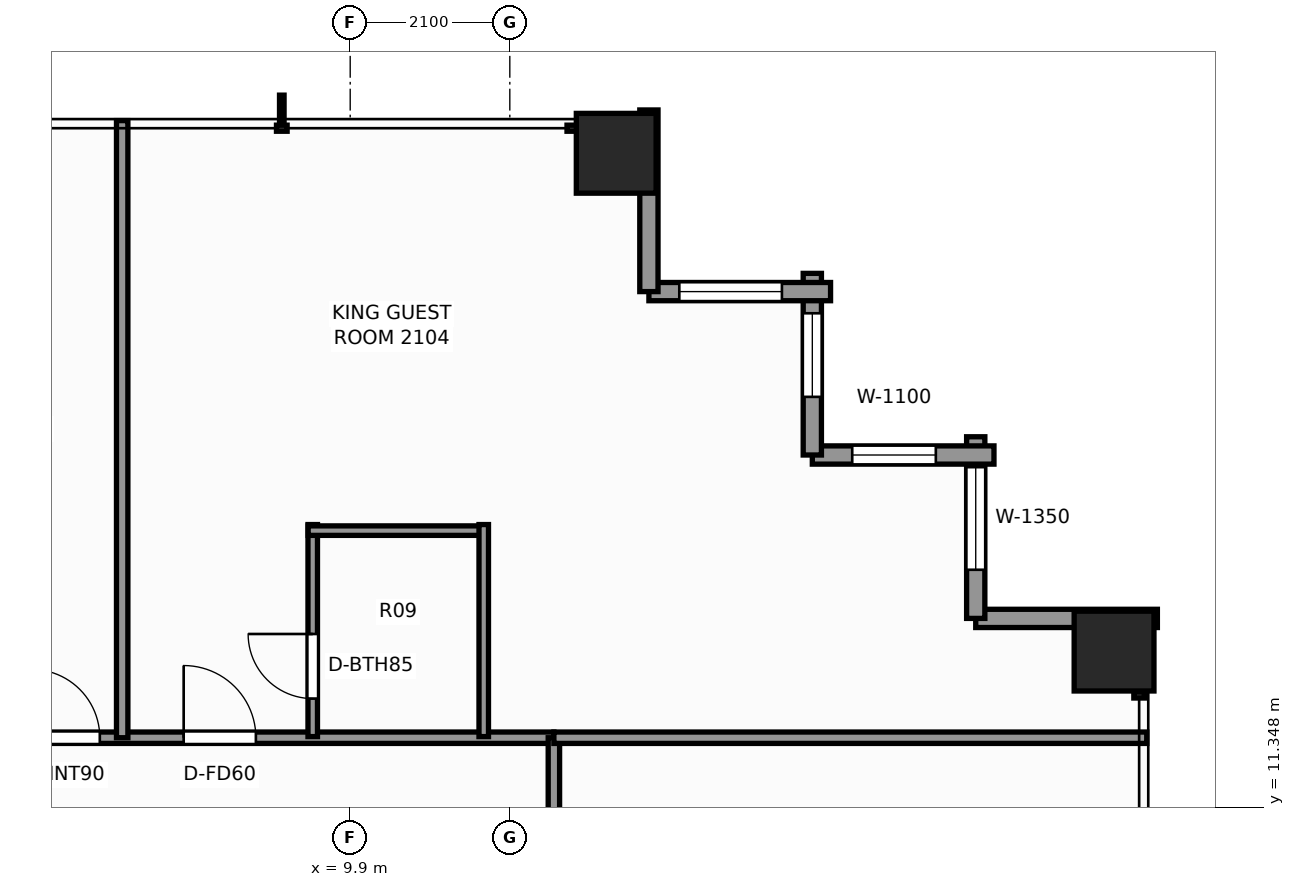
"""IFC4 building model, lengths in metres.
Left out: names, types, materials, properties, quantities, classifications, styles, units other than length and angle.
Written with IfcOpenShell. Run it as: python <this file> out.ifc"""

import sys

from ifc_helpers import new_model, si_unit, direction, frame, frame_2d, origin, origin_2d, place, context, subcontext, project, spatial, rectangle, extrude, element, fill, save


model = new_model("IFC4")
c1 = context("Model", 3, precision=1e-05, world=origin(), true_north=direction((0.0, 1.0)))
c2 = subcontext(c1, "Body", "Model", "MODEL_VIEW")
j1 = project(units=[si_unit("LENGTHUNIT", "METRE"), si_unit("PLANEANGLEUNIT", "RADIAN")], contexts=[c1])
p1 = place(None, origin())
s1 = spatial("IfcSite", under=j1, at=p1, CompositionType="ELEMENT")
p2 = place(p1, origin())
s2 = spatial("IfcBuilding", under=s1, at=p2, CompositionType="ELEMENT")
p3 = place(p2, frame((0.0, 0.0, 75.5)))
s3 = spatial("IfcBuildingStorey", under=s2, at=p3, CompositionType="ELEMENT", Elevation=75.5)
for number, where, z_axis, x_axis in (
    (1, (13.4, 19.95, 0.0), (0.0, 0.0, 1.0), (1.0, 0.0, 0.0)),
    (2, (19.95, 13.4, 0.0), (0.0, 0.0, 1.0), (1.0, 0.0, 0.0)),
):
    element("IfcColumn", number, at=place(p3, frame(where, z_axis=z_axis, x_axis=x_axis)), inside=s3, PredefinedType="COLUMN", context=c2, shape_type="SweptSolid", body=[
        extrude(rectangle(XDim=1.05, YDim=1.05, at=origin_2d()), origin(), (0.0, 0.0, 1.0), 3.3),
    ])
p4 = place(p3, frame((18.13, 13.83, 0.0), z_axis=(0.0, 0.0, 1.0), x_axis=(1.0, 0.0, 0.0)))
e3 = element("IfcWall", 3, at=p4, inside=s3, PredefinedType="STANDARD", context=c2, shape_type="SweptSolid", body=[
    extrude(rectangle(XDim=2.39, YDim=0.24, at=frame_2d((1.195, 0.0))), origin(), (0.0, 0.0, 1.0), 2.459),
])
p5 = place(p3, frame((18.13, 16.22, 0.0), z_axis=(0.0, 0.0, 1.0), x_axis=(0.0, -1.0, 0.0)))
e4 = element("IfcWall", 4, at=p5, inside=s3, PredefinedType="STANDARD", context=c2, shape_type="SweptSolid", body=[
    extrude(rectangle(XDim=2.39, YDim=0.24, at=frame_2d((1.195, 0.0))), origin(), (0.0, 0.0, 1.0), 2.459),
])
p6 = place(p5, frame((0.4, 0.0, 0.65)))
e5 = element("IfcOpeningElement", 5, at=p6, cuts=e4, PredefinedType="OPENING", context=c2, shape_type="SweptSolid", body=[
    extrude(rectangle(XDim=1.35, YDim=1.55, at=frame_2d((0.675, 0.775))), frame((0.0, 0.13, 0.0), z_axis=(0.0, -1.0, 0.0), x_axis=(1.0, 0.0, 0.0)), (0.0, 0.0, 1.0), 0.26),
])
p7 = place(p3, frame((15.98, 15.98, 0.0), z_axis=(0.0, 0.0, 1.0), x_axis=(1.0, 0.0, 0.0)))
e6 = element("IfcWall", 6, at=p7, inside=s3, PredefinedType="STANDARD", context=c2, shape_type="SweptSolid", body=[
    extrude(rectangle(XDim=2.39, YDim=0.24, at=frame_2d((1.195, 0.0))), origin(), (0.0, 0.0, 1.0), 2.459),
])
p8 = place(p7, frame((0.525, 0.0, 0.65)))
e7 = element("IfcOpeningElement", 7, at=p8, cuts=e6, PredefinedType="OPENING", context=c2, shape_type="SweptSolid", body=[
    extrude(rectangle(XDim=1.1, YDim=1.45, at=frame_2d((0.55, 0.725))), frame((0.0, 0.13, 0.0), z_axis=(0.0, -1.0, 0.0), x_axis=(1.0, 0.0, 0.0)), (0.0, 0.0, 1.0), 0.26),
])
p9 = place(p3, frame((15.98, 18.37, 0.0), z_axis=(0.0, 0.0, 1.0), x_axis=(0.0, -1.0, 0.0)))
e8 = element("IfcWall", 8, at=p9, inside=s3, PredefinedType="STANDARD", context=c2, shape_type="SweptSolid", body=[
    extrude(rectangle(XDim=2.39, YDim=0.24, at=frame_2d((1.195, 0.0))), origin(), (0.0, 0.0, 1.0), 2.459),
])
p10 = place(p9, frame((0.525, 0.0, 0.65)))
e9 = element("IfcOpeningElement", 9, at=p10, cuts=e8, PredefinedType="OPENING", context=c2, shape_type="SweptSolid", body=[
    extrude(rectangle(XDim=1.1, YDim=1.45, at=frame_2d((0.55, 0.725))), frame((0.0, 0.13, 0.0), z_axis=(0.0, -1.0, 0.0), x_axis=(1.0, 0.0, 0.0)), (0.0, 0.0, 1.0), 0.26),
])
p11 = place(p3, frame((13.83, 18.13, 0.0), z_axis=(0.0, 0.0, 1.0), x_axis=(1.0, 0.0, 0.0)))
e10 = element("IfcWall", 10, at=p11, inside=s3, PredefinedType="STANDARD", context=c2, shape_type="SweptSolid", body=[
    extrude(rectangle(XDim=2.39, YDim=0.24, at=frame_2d((1.195, 0.0))), origin(), (0.0, 0.0, 1.0), 2.459),
])
p12 = place(p11, frame((0.4, 0.0, 0.65)))
e11 = element("IfcOpeningElement", 11, at=p12, cuts=e10, PredefinedType="OPENING", context=c2, shape_type="SweptSolid", body=[
    extrude(rectangle(XDim=1.35, YDim=1.55, at=frame_2d((0.675, 0.775))), frame((0.0, 0.13, 0.0), z_axis=(0.0, -1.0, 0.0), x_axis=(1.0, 0.0, 0.0)), (0.0, 0.0, 1.0), 0.26),
])
p13 = place(p3, frame((13.83, 20.52, 0.0), z_axis=(0.0, 0.0, 1.0), x_axis=(0.0, -1.0, 0.0)))
e12 = element("IfcWall", 12, at=p13, inside=s3, PredefinedType="STANDARD", context=c2, shape_type="SweptSolid", body=[
    extrude(rectangle(XDim=2.39, YDim=0.24, at=frame_2d((1.195, 0.0))), origin(), (0.0, 0.0, 1.0), 2.459),
])
p14 = place(p3, frame((-12.42, 12.26, 0.0), z_axis=(0.0, 0.0, 1.0), x_axis=(1.0, 0.0, 0.0)))
e13 = element("IfcWall", 13, at=p14, inside=s3, PredefinedType="PARTITIONING", context=c2, shape_type="SweptSolid", body=[
    extrude(rectangle(XDim=25.0, YDim=0.15, at=frame_2d((12.5, 0.0))), origin(), (0.0, 0.0, 1.0), 2.292),
])
p15 = place(p14, frame((3.299, 0.0, 0.0)))
e14 = element("IfcOpeningElement", 14, at=p15, cuts=e13, PredefinedType="OPENING", context=c2, shape_type="SweptSolid", body=[
    extrude(rectangle(XDim=0.9, YDim=2.06, at=frame_2d((0.45, 1.03))), frame((0.0, 0.085, 0.0), z_axis=(0.0, -1.0, 0.0), x_axis=(1.0, 0.0, 0.0)), (0.0, 0.0, 1.0), 0.17),
])
p16 = place(p14, frame((5.634, 0.0, 0.0)))
e15 = element("IfcOpeningElement", 15, at=p16, cuts=e13, PredefinedType="OPENING", context=c2, shape_type="SweptSolid", body=[
    extrude(rectangle(XDim=0.9, YDim=2.06, at=frame_2d((0.45, 1.03))), frame((0.0, 0.085, 0.0), z_axis=(0.0, -1.0, 0.0), x_axis=(1.0, 0.0, 0.0)), (0.0, 0.0, 1.0), 0.17),
])
p17 = place(p14, frame((9.758, 0.0, 0.0)))
e16 = element("IfcOpeningElement", 16, at=p17, cuts=e13, PredefinedType="OPENING", context=c2, shape_type="SweptSolid", body=[
    extrude(rectangle(XDim=0.9, YDim=2.06, at=frame_2d((0.45, 1.03))), frame((0.0, 0.085, 0.0), z_axis=(0.0, -1.0, 0.0), x_axis=(1.0, 0.0, 0.0)), (0.0, 0.0, 1.0), 0.17),
])
p18 = place(p14, frame((13.357, 0.0, 0.0)))
e17 = element("IfcOpeningElement", 17, at=p18, cuts=e13, PredefinedType="OPENING", context=c2, shape_type="SweptSolid", body=[
    extrude(rectangle(XDim=0.95, YDim=2.06, at=frame_2d((0.475, 1.03))), frame((0.0, 0.085, 0.0), z_axis=(0.0, -1.0, 0.0), x_axis=(1.0, 0.0, 0.0)), (0.0, 0.0, 1.0), 0.17),
])
p19 = place(p14, frame((18.125, 0.0, 0.0)))
e18 = element("IfcOpeningElement", 18, at=p19, cuts=e13, PredefinedType="OPENING", context=c2, shape_type="SweptSolid", body=[
    extrude(rectangle(XDim=0.9, YDim=2.06, at=frame_2d((0.45, 1.03))), frame((0.0, 0.085, 0.0), z_axis=(0.0, -1.0, 0.0), x_axis=(1.0, 0.0, 0.0)), (0.0, 0.0, 1.0), 0.17),
])
p20 = place(p14, frame((20.129, 0.0, 0.0)))
e19 = element("IfcOpeningElement", 19, at=p20, cuts=e13, PredefinedType="OPENING", context=c2, shape_type="SweptSolid", body=[
    extrude(rectangle(XDim=0.95, YDim=2.06, at=frame_2d((0.475, 1.03))), frame((0.0, 0.085, 0.0), z_axis=(0.0, -1.0, 0.0), x_axis=(1.0, 0.0, 0.0)), (0.0, 0.0, 1.0), 0.17),
])
p21 = place(p3, frame((12.58, -12.58, 0.0), z_axis=(0.0, 0.0, 1.0), x_axis=(0.0, 1.0, 0.0)))
e20 = element("IfcWall", 20, at=p21, inside=s3, PredefinedType="PARTITIONING", context=c2, shape_type="SweptSolid", body=[
    extrude(rectangle(XDim=24.84, YDim=0.15, at=frame_2d((12.42, 0.0))), origin(), (0.0, 0.0, 1.0), 2.292),
])
p22 = place(p21, frame((4.149, 0.0, 0.0)))
e21 = element("IfcOpeningElement", 21, at=p22, cuts=e20, PredefinedType="OPENING", context=c2, shape_type="SweptSolid", body=[
    extrude(rectangle(XDim=0.95, YDim=2.06, at=frame_2d((0.475, 1.03))), frame((0.0, 0.085, 0.0), z_axis=(0.0, -1.0, 0.0), x_axis=(1.0, 0.0, 0.0)), (0.0, 0.0, 1.0), 0.17),
])
p23 = place(p21, frame((10.28, 0.0, 0.0)))
e22 = element("IfcOpeningElement", 22, at=p23, cuts=e20, PredefinedType="OPENING", context=c2, shape_type="SweptSolid", body=[
    extrude(rectangle(XDim=0.95, YDim=2.06, at=frame_2d((0.475, 1.03))), frame((0.0, 0.085, 0.0), z_axis=(0.0, -1.0, 0.0), x_axis=(1.0, 0.0, 0.0)), (0.0, 0.0, 1.0), 0.17),
])
p24 = place(p21, frame((18.983, 0.0, 0.0)))
e23 = element("IfcOpeningElement", 23, at=p24, cuts=e20, PredefinedType="OPENING", context=c2, shape_type="SweptSolid", body=[
    extrude(rectangle(XDim=0.95, YDim=2.06, at=frame_2d((0.475, 1.03))), frame((0.0, 0.085, 0.0), z_axis=(0.0, -1.0, 0.0), x_axis=(1.0, 0.0, 0.0)), (0.0, 0.0, 1.0), 0.17),
])
p25 = place(p21, frame((20.996, 0.0, 0.0)))
e24 = element("IfcOpeningElement", 24, at=p25, cuts=e20, PredefinedType="OPENING", context=c2, shape_type="SweptSolid", body=[
    extrude(rectangle(XDim=0.9, YDim=2.06, at=frame_2d((0.45, 1.03))), frame((0.0, 0.085, 0.0), z_axis=(0.0, -1.0, 0.0), x_axis=(1.0, 0.0, 0.0)), (0.0, 0.0, 1.0), 0.17),
])
p26 = place(p3, frame((12.58, 12.26, 0.0), z_axis=(0.0, 0.0, 1.0), x_axis=(1.0, 0.0, 0.0)))
e25 = element("IfcWall", 25, at=p26, inside=s3, PredefinedType="PARTITIONING", context=c2, shape_type="SweptSolid", body=[
    extrude(rectangle(XDim=7.8, YDim=0.15, at=frame_2d((3.9, 0.0))), origin(), (0.0, 0.0, 1.0), 2.292),
])
p27 = place(p3, frame((6.9, 12.26, 0.0), z_axis=(0.0, 0.0, 1.0), x_axis=(0.0, 1.0, 0.0)))
e26 = element("IfcWall", 26, at=p27, inside=s3, PredefinedType="PARTITIONING", context=c2, shape_type="SweptSolid", body=[
    extrude(rectangle(XDim=8.12, YDim=0.15, at=frame_2d((4.06, 0.0))), origin(), (0.0, 0.0, 1.0), 2.449),
])
p28 = place(p3, frame((9.407, 12.275, 0.0), z_axis=(0.0, 0.0, 1.0), x_axis=(0.0, 1.0, 0.0)))
e27 = element("IfcWall", 27, at=p28, inside=s3, PredefinedType="PARTITIONING", context=c2, shape_type="SweptSolid", body=[
    extrude(rectangle(XDim=2.79, YDim=0.125, at=frame_2d((1.395, 0.0))), origin(), (0.0, 0.0, 1.0), 3.08),
])
p29 = place(p28, frame((0.5, 0.0, 0.0)))
e28 = element("IfcOpeningElement", 28, at=p29, cuts=e27, PredefinedType="OPENING", context=c2, shape_type="SweptSolid", body=[
    extrude(rectangle(XDim=0.85, YDim=2.03, at=frame_2d((0.425, 1.015))), frame((0.0, 0.073, 0.0), z_axis=(0.0, -1.0, 0.0), x_axis=(1.0, 0.0, 0.0)), (0.0, 0.0, 1.0), 0.145),
])
p30 = place(p3, frame((9.347, 14.985, 0.0), z_axis=(0.0, 0.0, 1.0), x_axis=(1.0, 0.0, 0.0)))
e29 = element("IfcWall", 29, at=p30, inside=s3, PredefinedType="PARTITIONING", context=c2, shape_type="SweptSolid", body=[
    extrude(rectangle(XDim=2.37, YDim=0.125, at=frame_2d((1.185, 0.0))), origin(), (0.0, 0.0, 1.0), 2.292),
])
p31 = place(p3, frame((11.657, 12.275, 0.0), z_axis=(0.0, 0.0, 1.0), x_axis=(0.0, 1.0, 0.0)))
e30 = element("IfcWall", 30, at=p31, inside=s3, PredefinedType="PARTITIONING", context=c2, shape_type="SweptSolid", body=[
    extrude(rectangle(XDim=2.79, YDim=0.125, at=frame_2d((1.395, 0.0))), origin(), (0.0, 0.0, 1.0), 2.292),
])
p32 = place(p6, origin())
e31 = element("IfcWindow", 31, at=p32, inside=s3, PartitioningType="SINGLE_PANEL", PredefinedType="WINDOW", context=c2, shape_type="SweptSolid", body=[
    extrude(rectangle(XDim=1.35, YDim=1.55, at=frame_2d((0.675, 0.775))), frame((0.0, 0.03, 0.0), z_axis=(0.0, -1.0, 0.0), x_axis=(1.0, 0.0, 0.0)), (0.0, 0.0, 1.0), 0.06),
])
fill(e5, e31)
p33 = place(p8, origin())
e32 = element("IfcWindow", 32, at=p33, inside=s3, PartitioningType="SINGLE_PANEL", PredefinedType="WINDOW", context=c2, shape_type="SweptSolid", body=[
    extrude(rectangle(XDim=1.1, YDim=1.45, at=frame_2d((0.55, 0.725))), frame((0.0, 0.03, 0.0), z_axis=(0.0, -1.0, 0.0), x_axis=(1.0, 0.0, 0.0)), (0.0, 0.0, 1.0), 0.06),
])
fill(e7, e32)
p34 = place(p10, origin())
e33 = element("IfcWindow", 33, at=p34, inside=s3, PartitioningType="SINGLE_PANEL", PredefinedType="WINDOW", context=c2, shape_type="SweptSolid", body=[
    extrude(rectangle(XDim=1.1, YDim=1.45, at=frame_2d((0.55, 0.725))), frame((0.0, 0.03, 0.0), z_axis=(0.0, -1.0, 0.0), x_axis=(1.0, 0.0, 0.0)), (0.0, 0.0, 1.0), 0.06),
])
fill(e9, e33)
p35 = place(p12, origin())
e34 = element("IfcWindow", 34, at=p35, inside=s3, PartitioningType="SINGLE_PANEL", PredefinedType="WINDOW", context=c2, shape_type="SweptSolid", body=[
    extrude(rectangle(XDim=1.35, YDim=1.55, at=frame_2d((0.675, 0.775))), frame((0.0, 0.03, 0.0), z_axis=(0.0, -1.0, 0.0), x_axis=(1.0, 0.0, 0.0)), (0.0, 0.0, 1.0), 0.06),
])
fill(e11, e34)
p36 = place(p19, origin())
e35 = element("IfcDoor", 35, at=p36, inside=s3, OperationType="SINGLE_SWING_LEFT", PredefinedType="DOOR", context=c2, shape_type="SweptSolid", body=[
    extrude(rectangle(XDim=0.9, YDim=2.06, at=frame_2d((0.45, 1.03))), frame((0.0, 0.025, 0.0), z_axis=(0.0, -1.0, 0.0), x_axis=(1.0, 0.0, 0.0)), (0.0, 0.0, 1.0), 0.05),
])
fill(e18, e35)
p37 = place(p29, origin())
e36 = element("IfcDoor", 36, at=p37, inside=s3, OperationType="SINGLE_SWING_RIGHT", PredefinedType="DOOR", context=c2, shape_type="SweptSolid", body=[
    extrude(rectangle(XDim=0.85, YDim=2.03, at=frame_2d((0.425, 1.015))), frame((0.0, 0.025, 0.0), z_axis=(0.0, -1.0, 0.0), x_axis=(1.0, 0.0, 0.0)), (0.0, 0.0, 1.0), 0.05),
])
fill(e28, e36)
p38 = place(p20, origin())
e37 = element("IfcDoor", 37, at=p38, inside=s3, OperationType="SINGLE_SWING_LEFT", PredefinedType="DOOR", context=c2, shape_type="SweptSolid", body=[
    extrude(rectangle(XDim=0.95, YDim=2.06, at=frame_2d((0.475, 1.03))), frame((0.0, 0.025, 0.0), z_axis=(0.0, -1.0, 0.0), x_axis=(1.0, 0.0, 0.0)), (0.0, 0.0, 1.0), 0.05),
])
fill(e19, e37)
save(model, sys.argv[1])
